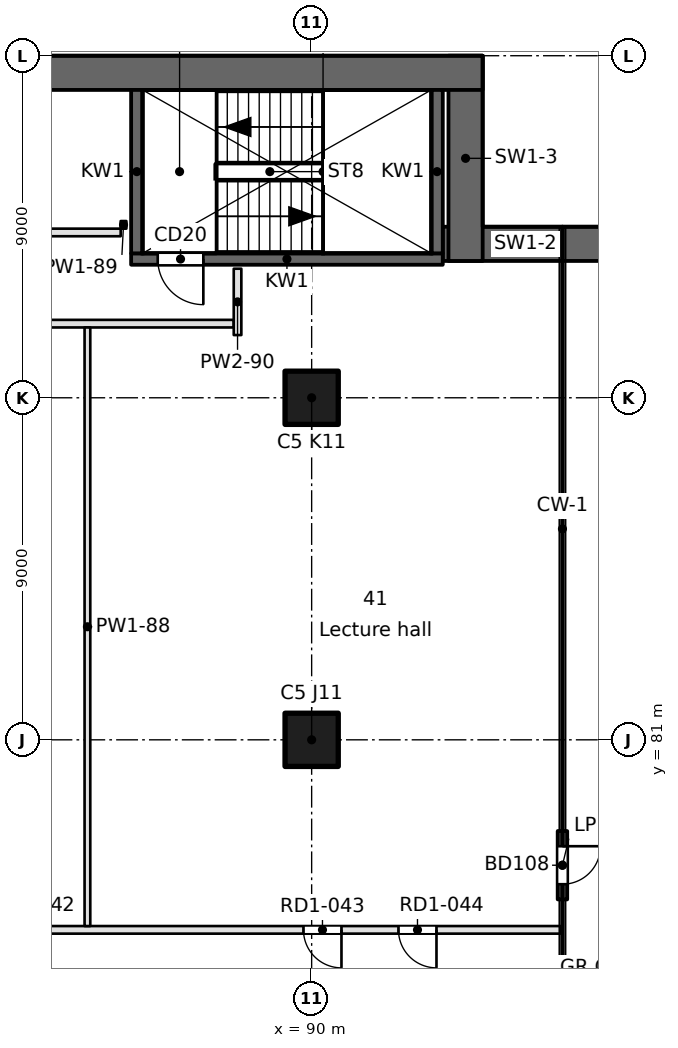
"""IFC4 building model, lengths in metres.
Left out: names, types, materials, properties, quantities, classifications, styles, units other than length and angle.
Written with IfcOpenShell. Run it as: python <this file> out.ifc"""

import sys

from ifc_helpers import new_model, si_unit, direction, frame, frame_2d, origin, origin_2d, place, context, subcontext, project, spatial, rectangle, extrude, element, fill, save


model = new_model("IFC4")
c1 = context("Model", 3, precision=1e-05, world=origin(), true_north=direction((0.0, 1.0)))
c2 = subcontext(c1, "Body", "Model", "MODEL_VIEW")
j1 = project(units=[si_unit("LENGTHUNIT", "METRE"), si_unit("PLANEANGLEUNIT", "RADIAN")], contexts=[c1])
p1 = place(None, origin())
s1 = spatial("IfcSite", under=j1, at=p1, CompositionType="ELEMENT")
p2 = place(p1, origin())
s2 = spatial("IfcBuilding", under=s1, at=p2, CompositionType="ELEMENT")
p3 = place(p2, frame((0.0, 0.0, 46.9)))
s3 = spatial("IfcBuildingStorey", under=s2, at=p3, CompositionType="ELEMENT", Elevation=46.9)
for number, where, z_axis, x_axis in (
    (1, (90.0, 81.0, 0.0), (0.0, 0.0, 1.0), (1.0, 0.0, 0.0)),
    (2, (90.0, 90.0, 0.0), (0.0, 0.0, 1.0), (1.0, 0.0, 0.0)),
):
    element("IfcColumn", number, at=place(p3, frame(where, z_axis=z_axis, x_axis=x_axis)), inside=s3, PredefinedType="COLUMN", context=c2, shape_type="SweptSolid", body=[
        extrude(rectangle(XDim=1.4, YDim=1.4, at=origin_2d()), origin(), (0.0, 0.0, 1.0), 3.7),
    ])
p4 = place(p3, frame((97.8, 94.05, 0.0), z_axis=(0.0, 0.0, 1.0), x_axis=(-1.0, 0.0, 0.0)))
e3 = element("IfcWall", 3, at=p4, inside=s3, PredefinedType="SHEAR", context=c2, shape_type="SweptSolid", body=[
    extrude(rectangle(XDim=4.351, YDim=0.9, at=frame_2d((2.175, 0.0))), origin(), (0.0, 0.0, 1.0), 3.7),
])
p5 = place(p3, frame((94.05, 93.6, 0.0), z_axis=(0.0, 0.0, 1.0), x_axis=(0.0, 1.0, 0.0)))
e4 = element("IfcWall", 4, at=p5, inside=s3, PredefinedType="SHEAR", context=c2, shape_type="SweptSolid", body=[
    extrude(rectangle(XDim=5.4, YDim=0.9, at=frame_2d((2.7, 0.0))), origin(), (0.0, 0.0, 1.0), 3.7),
])
p6 = place(p3, frame((94.5, 98.55, 0.0), z_axis=(0.0, 0.0, 1.0), x_axis=(-1.0, 0.0, 0.0)))
e5 = element("IfcWall", 5, at=p6, inside=s3, PredefinedType="SHEAR", context=c2, shape_type="SweptSolid", body=[
    extrude(rectangle(XDim=90.0, YDim=0.9, at=frame_2d((45.0, 0.0))), origin(), (0.0, 0.0, 1.0), 3.7),
])
p7 = place(p3, frame((96.599, 76.801, 0.0), z_axis=(0.0, 0.0, 1.0), x_axis=(0.0, 1.0, 0.0)))
e6 = element("IfcWall", 6, at=p7, inside=s3, PredefinedType="SOLIDWALL", context=c2, shape_type="SweptSolid", body=[
    extrude(rectangle(XDim=1.8, YDim=0.25, at=frame_2d((0.9, 0.0))), origin(), (0.0, 0.0, 1.0), 3.3),
])
p8 = place(p7, frame((0.4, 0.0, 0.0)))
e7 = element("IfcOpeningElement", 7, at=p8, cuts=e6, PredefinedType="OPENING", context=c2, shape_type="SweptSolid", body=[
    extrude(rectangle(XDim=1.0, YDim=2.1, at=frame_2d((0.5, 1.05))), frame((0.0, 0.125, 0.0), z_axis=(0.0, -1.0, 0.0), x_axis=(1.0, 0.0, 0.0)), (0.0, 0.0, 1.0), 0.25),
])
p9 = place(p3, frame((85.25, 93.65, -0.4), z_axis=(0.0, 0.0, 1.0), x_axis=(1.0, 0.0, 0.0)))
e8 = element("IfcWall", 8, at=p9, inside=s3, PredefinedType="SOLIDWALL", context=c2, shape_type="SweptSolid", body=[
    extrude(rectangle(XDim=8.2, YDim=0.3, at=frame_2d((4.1, 0.0))), origin(), (0.0, 0.0, 1.0), 3.7),
])
p10 = place(p9, frame((0.7, 0.0, 0.4)))
e9 = element("IfcOpeningElement", 9, at=p10, cuts=e8, PredefinedType="OPENING", context=c2, shape_type="SweptSolid", body=[
    extrude(rectangle(XDim=1.2, YDim=2.1, at=frame_2d((0.6, 1.05))), frame((0.0, 0.15, 0.0), z_axis=(0.0, -1.0, 0.0), x_axis=(1.0, 0.0, 0.0)), (0.0, 0.0, 1.0), 0.3),
])
for number, where, z_axis, x_axis in (
    (10, (85.4, 93.8, -0.4), (0.0, 0.0, 1.0), (0.0, 1.0, 0.0)),
    (11, (93.3, 93.8, -0.4), (0.0, 0.0, 1.0), (0.0, 1.0, 0.0)),
):
    element("IfcWall", number, at=place(p3, frame(where, z_axis=z_axis, x_axis=x_axis)), inside=s3, PredefinedType="SOLIDWALL", context=c2, shape_type="SweptSolid", body=[
        extrude(rectangle(XDim=4.3, YDim=0.3, at=frame_2d((2.15, 0.0))), origin(), (0.0, 0.0, 1.0), 3.7),
    ])
p11 = place(p3, frame((39.2, 76.0, 0.0), z_axis=(0.0, 0.0, 1.0), x_axis=(1.0, 0.0, 0.0)))
e12 = element("IfcWall", 12, at=p11, inside=s3, PredefinedType="PARTITIONING", context=c2, shape_type="SweptSolid", body=[
    extrude(rectangle(XDim=57.345, YDim=0.2, at=frame_2d((28.672, 0.0))), origin(), (0.0, 0.0, 1.0), 3.3),
])
p12 = place(p11, frame((12.897, 0.0, 0.0)))
e13 = element("IfcOpeningElement", 13, at=p12, cuts=e12, PredefinedType="OPENING", context=c2, shape_type="SweptSolid", body=[
    extrude(rectangle(XDim=1.0, YDim=2.1, at=frame_2d((0.5, 1.05))), frame((0.0, 0.1, 0.0), z_axis=(0.0, -1.0, 0.0), x_axis=(1.0, 0.0, 0.0)), (0.0, 0.0, 1.0), 0.2),
])
p13 = place(p11, frame((15.397, 0.0, 0.0)))
e14 = element("IfcOpeningElement", 14, at=p13, cuts=e12, PredefinedType="OPENING", context=c2, shape_type="SweptSolid", body=[
    extrude(rectangle(XDim=1.0, YDim=2.1, at=frame_2d((0.5, 1.05))), frame((0.0, 0.1, 0.0), z_axis=(0.0, -1.0, 0.0), x_axis=(1.0, 0.0, 0.0)), (0.0, 0.0, 1.0), 0.2),
])
p14 = place(p11, frame((21.912, 0.0, 0.0)))
e15 = element("IfcOpeningElement", 15, at=p14, cuts=e12, PredefinedType="OPENING", context=c2, shape_type="SweptSolid", body=[
    extrude(rectangle(XDim=1.0, YDim=2.1, at=frame_2d((0.5, 1.05))), frame((0.0, 0.1, 0.0), z_axis=(0.0, -1.0, 0.0), x_axis=(1.0, 0.0, 0.0)), (0.0, 0.0, 1.0), 0.2),
])
p15 = place(p11, frame((24.412, 0.0, 0.0)))
e16 = element("IfcOpeningElement", 16, at=p15, cuts=e12, PredefinedType="OPENING", context=c2, shape_type="SweptSolid", body=[
    extrude(rectangle(XDim=1.0, YDim=2.1, at=frame_2d((0.5, 1.05))), frame((0.0, 0.1, 0.0), z_axis=(0.0, -1.0, 0.0), x_axis=(1.0, 0.0, 0.0)), (0.0, 0.0, 1.0), 0.2),
])
p16 = place(p11, frame((30.802, 0.0, 0.0)))
e17 = element("IfcOpeningElement", 17, at=p16, cuts=e12, PredefinedType="OPENING", context=c2, shape_type="SweptSolid", body=[
    extrude(rectangle(XDim=1.0, YDim=2.1, at=frame_2d((0.5, 1.05))), frame((0.0, 0.1, 0.0), z_axis=(0.0, -1.0, 0.0), x_axis=(1.0, 0.0, 0.0)), (0.0, 0.0, 1.0), 0.2),
])
p17 = place(p11, frame((33.302, 0.0, 0.0)))
e18 = element("IfcOpeningElement", 18, at=p17, cuts=e12, PredefinedType="OPENING", context=c2, shape_type="SweptSolid", body=[
    extrude(rectangle(XDim=1.0, YDim=2.1, at=frame_2d((0.5, 1.05))), frame((0.0, 0.1, 0.0), z_axis=(0.0, -1.0, 0.0), x_axis=(1.0, 0.0, 0.0)), (0.0, 0.0, 1.0), 0.2),
])
p18 = place(p11, frame((39.817, 0.0, 0.0)))
e19 = element("IfcOpeningElement", 19, at=p18, cuts=e12, PredefinedType="OPENING", context=c2, shape_type="SweptSolid", body=[
    extrude(rectangle(XDim=1.0, YDim=2.1, at=frame_2d((0.5, 1.05))), frame((0.0, 0.1, 0.0), z_axis=(0.0, -1.0, 0.0), x_axis=(1.0, 0.0, 0.0)), (0.0, 0.0, 1.0), 0.2),
])
p19 = place(p11, frame((42.317, 0.0, 0.0)))
e20 = element("IfcOpeningElement", 20, at=p19, cuts=e12, PredefinedType="OPENING", context=c2, shape_type="SweptSolid", body=[
    extrude(rectangle(XDim=1.0, YDim=2.1, at=frame_2d((0.5, 1.05))), frame((0.0, 0.1, 0.0), z_axis=(0.0, -1.0, 0.0), x_axis=(1.0, 0.0, 0.0)), (0.0, 0.0, 1.0), 0.2),
])
p20 = place(p11, frame((50.585, 0.0, 0.0)))
e21 = element("IfcOpeningElement", 21, at=p20, cuts=e12, PredefinedType="OPENING", context=c2, shape_type="SweptSolid", body=[
    extrude(rectangle(XDim=1.0, YDim=2.1, at=frame_2d((0.5, 1.05))), frame((0.0, 0.1, 0.0), z_axis=(0.0, -1.0, 0.0), x_axis=(1.0, 0.0, 0.0)), (0.0, 0.0, 1.0), 0.2),
])
p21 = place(p11, frame((53.085, 0.0, 0.0)))
e22 = element("IfcOpeningElement", 22, at=p21, cuts=e12, PredefinedType="OPENING", context=c2, shape_type="SweptSolid", body=[
    extrude(rectangle(XDim=1.0, YDim=2.1, at=frame_2d((0.5, 1.05))), frame((0.0, 0.1, 0.0), z_axis=(0.0, -1.0, 0.0), x_axis=(1.0, 0.0, 0.0)), (0.0, 0.0, 1.0), 0.2),
])
p22 = place(p3, frame((87.95, 91.95, 0.0), z_axis=(0.0, 0.0, 1.0), x_axis=(-1.0, 0.0, 0.0)))
e23 = element("IfcWall", 23, at=p22, inside=s3, PredefinedType="PARTITIONING", context=c2, shape_type="SweptSolid", body=[
    extrude(rectangle(XDim=48.75, YDim=0.2, at=frame_2d((24.375, 0.0))), origin(), (0.0, 0.0, 1.0), 3.3),
])
p23 = place(p3, frame((75.704, 94.35, 0.0), z_axis=(0.0, 0.0, 1.0), x_axis=(1.0, 0.0, 0.0)))
e24 = element("IfcWall", 24, at=p23, inside=s3, PredefinedType="PARTITIONING", context=c2, shape_type="SweptSolid", body=[
    extrude(rectangle(XDim=9.271, YDim=0.2, at=frame_2d((4.635, 0.0))), origin(), (0.0, 0.0, 1.0), 3.3),
])
p24 = place(p23, frame((3.736, 0.0, 0.0)))
e25 = element("IfcOpeningElement", 25, at=p24, cuts=e24, PredefinedType="OPENING", context=c2, shape_type="SweptSolid", body=[
    extrude(rectangle(XDim=1.8, YDim=2.1, at=frame_2d((0.9, 1.05))), frame((0.0, 0.1, 0.0), z_axis=(0.0, -1.0, 0.0), x_axis=(1.0, 0.0, 0.0)), (0.0, 0.0, 1.0), 0.2),
])
p25 = place(p3, frame((84.1, 91.85, 0.0), z_axis=(0.0, 0.0, 1.0), x_axis=(0.0, -1.0, 0.0)))
e26 = element("IfcWall", 26, at=p25, inside=s3, PredefinedType="PARTITIONING", context=c2, shape_type="SweptSolid", body=[
    extrude(rectangle(XDim=15.75, YDim=0.15, at=frame_2d((7.875, 0.0))), origin(), (0.0, 0.0, 1.0), 3.3),
])
p26 = place(p3, frame((85.05, 94.65, 0.0), z_axis=(0.0, 0.0, 1.0), x_axis=(0.0, -1.0, 0.0)))
e27 = element("IfcWall", 27, at=p26, inside=s3, PredefinedType="PARTITIONING", context=c2, shape_type="SweptSolid", body=[
    extrude(rectangle(XDim=0.2, YDim=0.15, at=frame_2d((0.1, 0.0))), origin(), (0.0, 0.0, 1.0), 3.3),
])
p27 = place(p3, frame((88.05, 93.396, 0.0), z_axis=(0.0, 0.0, 1.0), x_axis=(0.0, -1.0, 0.0)))
e28 = element("IfcWall", 28, at=p27, inside=s3, PredefinedType="PARTITIONING", context=c2, shape_type="SweptSolid", body=[
    extrude(rectangle(XDim=1.746, YDim=0.2, at=frame_2d((0.873, 0.0))), origin(), (0.0, 0.0, 1.0), 3.3),
])
p28 = place(p8, frame((1.0, 0.0, 0.0), z_axis=(0.0, 0.0, 1.0), x_axis=(-1.0, 0.0, 0.0)))
e29 = element("IfcDoor", 29, at=p28, inside=s3, OperationType="SINGLE_SWING_LEFT", PredefinedType="DOOR", context=c2, shape_type="SweptSolid", body=[
    extrude(rectangle(XDim=1.0, YDim=2.1, at=frame_2d((0.5, 1.05))), frame((0.0, 0.025, 0.0), z_axis=(0.0, -1.0, 0.0), x_axis=(1.0, 0.0, 0.0)), (0.0, 0.0, 1.0), 0.05),
])
fill(e7, e29)
p29 = place(p10, frame((1.2, 0.0, 0.0), z_axis=(0.0, 0.0, 1.0), x_axis=(-1.0, 0.0, 0.0)))
e30 = element("IfcDoor", 30, at=p29, inside=s3, OperationType="SINGLE_SWING_LEFT", PredefinedType="DOOR", context=c2, shape_type="SweptSolid", body=[
    extrude(rectangle(XDim=1.2, YDim=2.1, at=frame_2d((0.6, 1.05))), frame((0.0, 0.025, 0.0), z_axis=(0.0, -1.0, 0.0), x_axis=(1.0, 0.0, 0.0)), (0.0, 0.0, 1.0), 0.05),
])
fill(e9, e30)
p30 = place(p20, frame((1.0, 0.0, 0.0), z_axis=(0.0, 0.0, 1.0), x_axis=(-1.0, 0.0, 0.0)))
e31 = element("IfcDoor", 31, at=p30, inside=s3, OperationType="SINGLE_SWING_LEFT", PredefinedType="DOOR", context=c2, shape_type="SweptSolid", body=[
    extrude(rectangle(XDim=1.0, YDim=2.1, at=frame_2d((0.5, 1.05))), frame((0.0, 0.025, 0.0), z_axis=(0.0, -1.0, 0.0), x_axis=(1.0, 0.0, 0.0)), (0.0, 0.0, 1.0), 0.05),
])
fill(e21, e31)
p31 = place(p21, frame((1.0, 0.0, 0.0), z_axis=(0.0, 0.0, 1.0), x_axis=(-1.0, 0.0, 0.0)))
e32 = element("IfcDoor", 32, at=p31, inside=s3, OperationType="SINGLE_SWING_LEFT", PredefinedType="DOOR", context=c2, shape_type="SweptSolid", body=[
    extrude(rectangle(XDim=1.0, YDim=2.1, at=frame_2d((0.5, 1.05))), frame((0.0, 0.025, 0.0), z_axis=(0.0, -1.0, 0.0), x_axis=(1.0, 0.0, 0.0)), (0.0, 0.0, 1.0), 0.05),
])
fill(e22, e32)
save(model, sys.argv[1])
